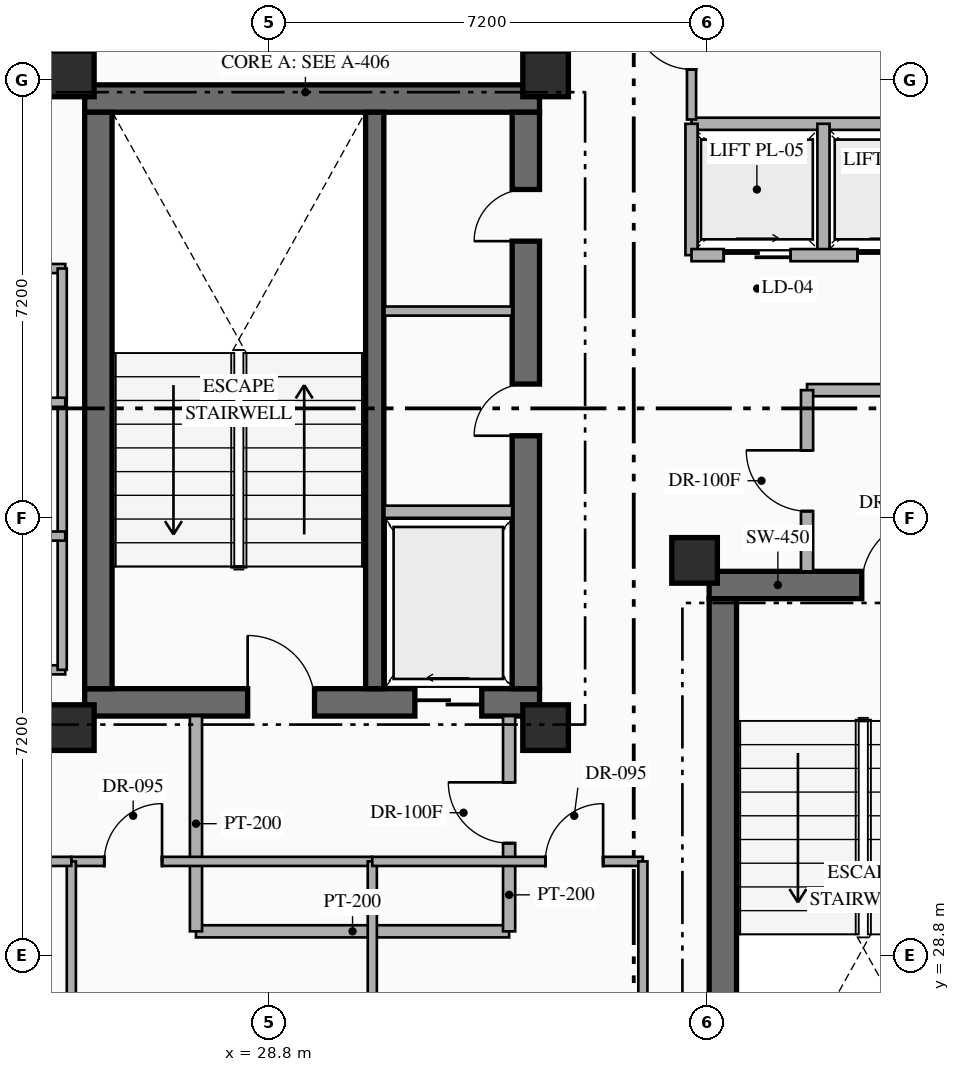
"""IFC4 building model, lengths in metres.
Left out: names, types, materials, properties, quantities, classifications, styles, units other than length and angle.
Written with IfcOpenShell. Run it as: python <this file> out.ifc"""

import sys

from ifc_helpers import new_model, si_unit, direction, frame, frame_2d, origin, origin_2d, place, context, subcontext, project, spatial, rectangle, hollow_rectangle, extrude, element, fill, save


model = new_model("IFC4")
c1 = context("Model", 3, precision=1e-05, world=origin(), true_north=direction((0.0, 1.0)))
c2 = subcontext(c1, "Body", "Model", "MODEL_VIEW")
j1 = project(units=[si_unit("LENGTHUNIT", "METRE"), si_unit("PLANEANGLEUNIT", "RADIAN")], contexts=[c1])
p1 = place(None, origin())
s1 = spatial("IfcSite", under=j1, at=p1, CompositionType="ELEMENT")
p2 = place(p1, origin())
s2 = spatial("IfcBuilding", under=s1, at=p2, CompositionType="ELEMENT")
p3 = place(p2, frame((0.0, 0.0, 213.15)))
s3 = spatial("IfcBuildingStorey", under=s2, at=p3, CompositionType="ELEMENT", Elevation=213.15)
p4 = place(p3, frame((25.77, 32.965, 0.0), z_axis=(0.0, 0.0, 1.0), x_axis=(1.0, 0.0, 0.0)))
e1 = element("IfcWall", 1, at=p4, inside=s3, PredefinedType="SHEAR", context=c2, shape_type="SweptSolid", body=[
    extrude(rectangle(XDim=7.48, YDim=0.45, at=frame_2d((3.74, 0.0))), origin(), (0.0, 0.0, 1.0), 3.6),
])
p5 = place(p4, frame((2.68, 0.0, 0.0)))
e2 = element("IfcOpeningElement", 2, at=p5, cuts=e1, PredefinedType="OPENING", context=c2, shape_type="SweptSolid", body=[
    extrude(rectangle(XDim=1.1, YDim=2.2, at=frame_2d((0.55, 1.1))), frame((0.0, 0.235, 0.0), z_axis=(0.0, -1.0, 0.0), x_axis=(1.0, 0.0, 0.0)), (0.0, 0.0, 1.0), 0.47),
])
p6 = place(p4, frame((5.43, 0.0, 0.0)))
e3 = element("IfcOpeningElement", 3, at=p6, cuts=e1, PredefinedType="OPENING", context=c2, shape_type="SweptSolid", body=[
    extrude(rectangle(XDim=1.1, YDim=2.15, at=frame_2d((0.55, 1.075))), frame((0.0, 0.235, 0.0), z_axis=(0.0, -1.0, 0.0), x_axis=(1.0, 0.0, 0.0)), (0.0, 0.0, 1.0), 0.47),
])
p7 = place(p3, frame((25.77, 42.895, 0.0), z_axis=(0.0, 0.0, 1.0), x_axis=(1.0, 0.0, 0.0)))
e4 = element("IfcWall", 4, at=p7, inside=s3, PredefinedType="SHEAR", context=c2, shape_type="SweptSolid", body=[
    extrude(rectangle(XDim=7.48, YDim=0.45, at=frame_2d((3.74, 0.0))), origin(), (0.0, 0.0, 1.0), 3.6),
])
p8 = place(p3, frame((25.995, 33.19, 0.0), z_axis=(0.0, 0.0, 1.0), x_axis=(0.0, 1.0, 0.0)))
e5 = element("IfcWall", 5, at=p8, inside=s3, PredefinedType="SHEAR", context=c2, shape_type="SweptSolid", body=[
    extrude(rectangle(XDim=9.48, YDim=0.45, at=frame_2d((4.74, 0.0))), origin(), (0.0, 0.0, 1.0), 3.6),
])
p9 = place(p3, frame((33.025, 33.19, 0.0), z_axis=(0.0, 0.0, 1.0), x_axis=(0.0, 1.0, 0.0)))
e6 = element("IfcWall", 6, at=p9, inside=s3, PredefinedType="SHEAR", context=c2, shape_type="SweptSolid", body=[
    extrude(rectangle(XDim=9.48, YDim=0.45, at=frame_2d((4.74, 0.0))), origin(), (0.0, 0.0, 1.0), 3.6),
])
p10 = place(p9, frame((4.16, 0.0, 0.0)))
e7 = element("IfcOpeningElement", 7, at=p10, cuts=e6, PredefinedType="OPENING", context=c2, shape_type="SweptSolid", body=[
    extrude(rectangle(XDim=0.85, YDim=2.08, at=frame_2d((0.425, 1.04))), frame((0.0, 0.235, 0.0), z_axis=(0.0, -1.0, 0.0), x_axis=(1.0, 0.0, 0.0)), (0.0, 0.0, 1.0), 0.47),
])
p11 = place(p9, frame((7.36, 0.0, 0.0)))
e8 = element("IfcOpeningElement", 8, at=p11, cuts=e6, PredefinedType="OPENING", context=c2, shape_type="SweptSolid", body=[
    extrude(rectangle(XDim=0.85, YDim=2.08, at=frame_2d((0.425, 1.04))), frame((0.0, 0.235, 0.0), z_axis=(0.0, -1.0, 0.0), x_axis=(1.0, 0.0, 0.0)), (0.0, 0.0, 1.0), 0.47),
])
p12 = place(p3, frame((30.54, 33.19, 0.0), z_axis=(0.0, 0.0, 1.0), x_axis=(0.0, 1.0, 0.0)))
e9 = element("IfcWall", 9, at=p12, inside=s3, PredefinedType="SHEAR", context=c2, shape_type="SweptSolid", body=[
    extrude(rectangle(XDim=9.48, YDim=0.3, at=frame_2d((4.74, 0.0))), origin(), (0.0, 0.0, 1.0), 3.6),
])
p13 = place(p3, frame((36.04, 34.895, 0.0), z_axis=(0.0, 0.0, 1.0), x_axis=(1.0, 0.0, 0.0)))
e10 = element("IfcWall", 10, at=p13, inside=s3, PredefinedType="SHEAR", context=c2, shape_type="SweptSolid", body=[
    extrude(rectangle(XDim=7.46, YDim=0.45, at=frame_2d((3.73, 0.0))), origin(), (0.0, 0.0, 1.0), 3.6),
])
p14 = place(p13, frame((2.51, 0.0, 0.0)))
e11 = element("IfcOpeningElement", 11, at=p14, cuts=e10, PredefinedType="OPENING", context=c2, shape_type="SweptSolid", body=[
    extrude(rectangle(XDim=1.1, YDim=2.2, at=frame_2d((0.55, 1.1))), frame((0.0, 0.235, 0.0), z_axis=(0.0, -1.0, 0.0), x_axis=(1.0, 0.0, 0.0)), (0.0, 0.0, 1.0), 0.47),
])
p15 = place(p13, frame((5.41, 0.0, 0.0)))
e12 = element("IfcOpeningElement", 12, at=p15, cuts=e10, PredefinedType="OPENING", context=c2, shape_type="SweptSolid", body=[
    extrude(rectangle(XDim=1.12, YDim=2.15, at=frame_2d((0.56, 1.075))), frame((0.0, 0.235, 0.0), z_axis=(0.0, -1.0, 0.0), x_axis=(1.0, 0.0, 0.0)), (0.0, 0.0, 1.0), 0.47),
])
p16 = place(p3, frame((36.265, 25.19, 0.0), z_axis=(0.0, 0.0, 1.0), x_axis=(0.0, 1.0, 0.0)))
e13 = element("IfcWall", 13, at=p16, inside=s3, PredefinedType="SHEAR", context=c2, shape_type="SweptSolid", body=[
    extrude(rectangle(XDim=9.48, YDim=0.45, at=frame_2d((4.74, 0.0))), origin(), (0.0, 0.0, 1.0), 3.6),
])
for number, where, z_axis, x_axis in (
    (14, (25.55, 32.55, 0.0), (0.0, 0.0, 1.0), (1.0, 0.0, 0.0)),
    (15, (33.35, 32.55, 0.0), (0.0, 0.0, 1.0), (1.0, 0.0, 0.0)),
    (16, (25.55, 43.3, 0.0), (0.0, 0.0, 1.0), (1.0, 0.0, 0.0)),
    (17, (33.35, 43.3, 0.0), (0.0, 0.0, 1.0), (1.0, 0.0, 0.0)),
    (18, (35.8, 35.3, 0.0), (0.0, 0.0, 1.0), (1.0, 0.0, 0.0)),
):
    element("IfcColumn", number, at=place(p3, frame(where, z_axis=z_axis, x_axis=x_axis)), inside=s3, PredefinedType="COLUMN", context=c2, shape_type="SweptSolid", body=[
        extrude(hollow_rectangle(XDim=0.75, YDim=0.75, WallThickness=0.028, at=origin_2d()), origin(), (0.0, 0.0, 1.0), 3.6),
    ])
p17 = place(p3, frame((30.7, 36.1, 0.0), z_axis=(0.0, 0.0, 1.0), x_axis=(1.0, 0.0, 0.0)))
e19 = element("IfcWall", 19, at=p17, inside=s3, PredefinedType="STANDARD", context=c2, shape_type="SweptSolid", body=[
    extrude(rectangle(XDim=2.1, YDim=0.2, at=frame_2d((1.05, 0.0))), origin(), (0.0, 0.0, 1.0), 3.35),
])
p18 = place(p3, frame((30.7, 39.4, 0.0), z_axis=(0.0, 0.0, 1.0), x_axis=(1.0, 0.0, 0.0)))
e20 = element("IfcWall", 20, at=p18, inside=s3, PredefinedType="PARTITIONING", context=c2, shape_type="SweptSolid", body=[
    extrude(rectangle(XDim=2.1, YDim=0.15, at=frame_2d((1.05, 0.0))), origin(), (0.0, 0.0, 1.0), 3.35),
])
p19 = place(p3, frame((27.6, 29.2, 0.0), z_axis=(0.0, 0.0, 1.0), x_axis=(1.0, 0.0, 0.0)))
e21 = element("IfcWall", 21, at=p19, inside=s3, PredefinedType="STANDARD", context=c2, shape_type="SweptSolid", body=[
    extrude(rectangle(XDim=5.15, YDim=0.2, at=frame_2d((2.575, 0.0))), origin(), (0.0, 0.0, 1.0), 3.35),
])
p20 = place(p3, frame((27.6, 29.2, 0.0), z_axis=(0.0, 0.0, 1.0), x_axis=(0.0, 1.0, 0.0)))
e22 = element("IfcWall", 22, at=p20, inside=s3, PredefinedType="STANDARD", context=c2, shape_type="SweptSolid", body=[
    extrude(rectangle(XDim=3.54, YDim=0.2, at=frame_2d((1.77, 0.0))), origin(), (0.0, 0.0, 1.0), 3.35),
])
p21 = place(p3, frame((32.75, 29.2, 0.0), z_axis=(0.0, 0.0, 1.0), x_axis=(0.0, 1.0, 0.0)))
e23 = element("IfcWall", 23, at=p21, inside=s3, PredefinedType="STANDARD", context=c2, shape_type="SweptSolid", body=[
    extrude(rectangle(XDim=3.54, YDim=0.2, at=frame_2d((1.77, 0.0))), origin(), (0.0, 0.0, 1.0), 3.35),
])
p22 = place(p21, frame((1.45, 0.0, 0.0)))
e24 = element("IfcOpeningElement", 24, at=p22, cuts=e23, PredefinedType="OPENING", context=c2, shape_type="SweptSolid", body=[
    extrude(rectangle(XDim=1.0, YDim=2.2, at=frame_2d((0.5, 1.1))), frame((0.0, 0.11, 0.0), z_axis=(0.0, -1.0, 0.0), x_axis=(1.0, 0.0, 0.0)), (0.0, 0.0, 1.0), 0.22),
])
p23 = place(p3, frame((37.65, 38.1, 0.0), z_axis=(0.0, 0.0, 1.0), x_axis=(1.0, 0.0, 0.0)))
e25 = element("IfcWall", 25, at=p23, inside=s3, PredefinedType="STANDARD", context=c2, shape_type="SweptSolid", body=[
    extrude(rectangle(XDim=5.3, YDim=0.2, at=frame_2d((2.65, 0.0))), origin(), (0.0, 0.0, 1.0), 3.35),
])
p24 = place(p3, frame((37.65, 35.12, 0.0), z_axis=(0.0, 0.0, 1.0), x_axis=(0.0, 1.0, 0.0)))
e26 = element("IfcWall", 26, at=p24, inside=s3, PredefinedType="STANDARD", context=c2, shape_type="SweptSolid", body=[
    extrude(rectangle(XDim=2.98, YDim=0.2, at=frame_2d((1.49, 0.0))), origin(), (0.0, 0.0, 1.0), 3.35),
])
p25 = place(p24, frame((0.99, 0.0, 0.0)))
e27 = element("IfcOpeningElement", 27, at=p25, cuts=e26, PredefinedType="OPENING", context=c2, shape_type="SweptSolid", body=[
    extrude(rectangle(XDim=1.0, YDim=2.2, at=frame_2d((0.5, 1.1))), frame((0.0, 0.11, 0.0), z_axis=(0.0, -1.0, 0.0), x_axis=(1.0, 0.0, 0.0)), (0.0, 0.0, 1.0), 0.22),
])
p26 = place(p3, frame((35.75, 42.48, 0.0), z_axis=(0.0, 0.0, 1.0), x_axis=(1.0, 0.0, 0.0)))
e28 = element("IfcWall", 28, at=p26, inside=s3, PredefinedType="STANDARD", context=c2, shape_type="SweptSolid", body=[
    extrude(rectangle(XDim=9.11, YDim=0.2, at=frame_2d((4.555, 0.0))), origin(), (0.0, 0.0, 1.0), 3.35),
])
for number, where, z_axis, x_axis in (
    (29, (35.75, 40.32, 0.0), (0.0, 0.0, 1.0), (0.0, 1.0, 0.0)),
    (30, (37.92, 40.32, 0.0), (0.0, 0.0, 1.0), (0.0, 1.0, 0.0)),
):
    element("IfcWall", number, at=place(p3, frame(where, z_axis=z_axis, x_axis=x_axis)), inside=s3, PredefinedType="STANDARD", context=c2, shape_type="SweptSolid", body=[
        extrude(rectangle(XDim=2.16, YDim=0.2, at=frame_2d((1.08, 0.0))), origin(), (0.0, 0.0, 1.0), 3.35),
    ])
p27 = place(p3, frame((35.75, 40.32, 0.0), z_axis=(0.0, 0.0, 1.0), x_axis=(1.0, 0.0, 0.0)))
e31 = element("IfcWall", 31, at=p27, inside=s3, PredefinedType="STANDARD", context=c2, shape_type="SweptSolid", body=[
    extrude(rectangle(XDim=9.11, YDim=0.2, at=frame_2d((4.555, 0.0))), origin(), (0.0, 0.0, 1.0), 3.35),
])
p28 = place(p27, frame((0.53, 0.0, 0.0)))
e32 = element("IfcOpeningElement", 32, at=p28, cuts=e31, PredefinedType="OPENING", context=c2, shape_type="SweptSolid", body=[
    extrude(rectangle(XDim=1.1, YDim=2.18, at=frame_2d((0.55, 1.09))), frame((0.0, 0.11, 0.0), z_axis=(0.0, -1.0, 0.0), x_axis=(1.0, 0.0, 0.0)), (0.0, 0.0, 1.0), 0.22),
])
p29 = place(p27, frame((2.73, 0.0, 0.0)))
e33 = element("IfcOpeningElement", 33, at=p29, cuts=e31, PredefinedType="OPENING", context=c2, shape_type="SweptSolid", body=[
    extrude(rectangle(XDim=1.1, YDim=2.18, at=frame_2d((0.55, 1.09))), frame((0.0, 0.11, 0.0), z_axis=(0.0, -1.0, 0.0), x_axis=(1.0, 0.0, 0.0)), (0.0, 0.0, 1.0), 0.22),
])
p30 = place(p27, frame((4.93, 0.0, 0.0)))
e34 = element("IfcOpeningElement", 34, at=p30, cuts=e31, PredefinedType="OPENING", context=c2, shape_type="SweptSolid", body=[
    extrude(rectangle(XDim=1.1, YDim=2.18, at=frame_2d((0.55, 1.09))), frame((0.0, 0.11, 0.0), z_axis=(0.0, -1.0, 0.0), x_axis=(1.0, 0.0, 0.0)), (0.0, 0.0, 1.0), 0.22),
])
p31 = place(p27, frame((7.13, 0.0, 0.0)))
e35 = element("IfcOpeningElement", 35, at=p31, cuts=e31, PredefinedType="OPENING", context=c2, shape_type="SweptSolid", body=[
    extrude(rectangle(XDim=1.1, YDim=2.18, at=frame_2d((0.55, 1.09))), frame((0.0, 0.11, 0.0), z_axis=(0.0, -1.0, 0.0), x_axis=(1.0, 0.0, 0.0)), (0.0, 0.0, 1.0), 0.22),
])
for number, where, z_axis, x_axis in (
    (36, (22.15, 33.5, 0.0), (0.0, 0.0, 1.0), (1.0, 0.0, 0.0)),
    (37, (22.15, 40.1, 0.0), (0.0, 0.0, 1.0), (1.0, 0.0, 0.0)),
):
    element("IfcWall", number, at=place(p3, frame(where, z_axis=z_axis, x_axis=x_axis)), inside=s3, PredefinedType="PARTITIONING", context=c2, shape_type="SweptSolid", body=[
        extrude(rectangle(XDim=3.3, YDim=0.15, at=frame_2d((1.65, 0.0))), origin(), (0.0, 0.0, 1.0), 3.35),
    ])
p32 = place(p3, frame((25.4, 33.5, 0.0), z_axis=(0.0, 0.0, 1.0), x_axis=(0.0, 1.0, 0.0)))
e38 = element("IfcWall", 38, at=p32, inside=s3, PredefinedType="PARTITIONING", context=c2, shape_type="SweptSolid", body=[
    extrude(rectangle(XDim=6.6, YDim=0.15, at=frame_2d((3.3, 0.0))), origin(), (0.0, 0.0, 1.0), 3.35),
])
for number, where, z_axis, x_axis in (
    (39, (22.15, 35.7, 0.0), (0.0, 0.0, 1.0), (1.0, 0.0, 0.0)),
    (40, (22.15, 37.9, 0.0), (0.0, 0.0, 1.0), (1.0, 0.0, 0.0)),
):
    element("IfcWall", number, at=place(p3, frame(where, z_axis=z_axis, x_axis=x_axis)), inside=s3, PredefinedType="PARTITIONING", context=c2, shape_type="SweptSolid", body=[
        extrude(rectangle(XDim=3.3, YDim=0.15, at=frame_2d((1.65, 0.0))), origin(), (0.0, 0.0, 1.0), 3.35),
    ])
p33 = place(p3, frame((25.55, 30.35, 0.0), z_axis=(0.0, 0.0, 1.0), x_axis=(1.0, 0.0, 0.0)))
e41 = element("IfcWall", 41, at=p33, inside=s3, PredefinedType="PARTITIONING", context=c2, shape_type="SweptSolid", body=[
    extrude(rectangle(XDim=4.95, YDim=0.15, at=frame_2d((2.475, 0.0))), origin(), (0.0, 0.0, 1.0), 3.35),
])
p34 = place(p33, frame((0.542, 0.0, 0.0)))
e42 = element("IfcOpeningElement", 42, at=p34, cuts=e41, PredefinedType="OPENING", context=c2, shape_type="SweptSolid", body=[
    extrude(rectangle(XDim=0.95, YDim=2.15, at=frame_2d((0.475, 1.075))), frame((0.0, 0.085, 0.0), z_axis=(0.0, -1.0, 0.0), x_axis=(1.0, 0.0, 0.0)), (0.0, 0.0, 1.0), 0.17),
])
p35 = place(p3, frame((25.55, 23.2, 0.0), z_axis=(0.0, 0.0, 1.0), x_axis=(0.0, 1.0, 0.0)))
e43 = element("IfcWall", 43, at=p35, inside=s3, PredefinedType="PARTITIONING", context=c2, shape_type="SweptSolid", body=[
    extrude(rectangle(XDim=7.15, YDim=0.15, at=frame_2d((3.575, 0.0))), origin(), (0.0, 0.0, 1.0), 2.757),
])
p36 = place(p3, frame((30.5, 23.2, 0.0), z_axis=(0.0, 0.0, 1.0), x_axis=(0.0, 1.0, 0.0)))
e44 = element("IfcWall", 44, at=p36, inside=s3, PredefinedType="PARTITIONING", context=c2, shape_type="SweptSolid", body=[
    extrude(rectangle(XDim=7.15, YDim=0.15, at=frame_2d((3.575, 0.0))), origin(), (0.0, 0.0, 1.0), 3.35),
])
p37 = place(p3, frame((30.5, 30.35, 0.0), z_axis=(0.0, 0.0, 1.0), x_axis=(1.0, 0.0, 0.0)))
e45 = element("IfcWall", 45, at=p37, inside=s3, PredefinedType="PARTITIONING", context=c2, shape_type="SweptSolid", body=[
    extrude(rectangle(XDim=4.45, YDim=0.15, at=frame_2d((2.225, 0.0))), origin(), (0.0, 0.0, 1.0), 3.35),
])
p38 = place(p37, frame((2.846, 0.0, 0.0)))
e46 = element("IfcOpeningElement", 46, at=p38, cuts=e45, PredefinedType="OPENING", context=c2, shape_type="SweptSolid", body=[
    extrude(rectangle(XDim=0.95, YDim=2.15, at=frame_2d((0.475, 1.075))), frame((0.0, 0.085, 0.0), z_axis=(0.0, -1.0, 0.0), x_axis=(1.0, 0.0, 0.0)), (0.0, 0.0, 1.0), 0.17),
])
p39 = place(p3, frame((34.95, 23.2, 0.0), z_axis=(0.0, 0.0, 1.0), x_axis=(0.0, 1.0, 0.0)))
e47 = element("IfcWall", 47, at=p39, inside=s3, PredefinedType="PARTITIONING", context=c2, shape_type="SweptSolid", body=[
    extrude(rectangle(XDim=7.15, YDim=0.15, at=frame_2d((3.575, 0.0))), origin(), (0.0, 0.0, 1.0), 3.35),
])
p40 = place(p3, frame((22.25, 30.35, 0.0), z_axis=(0.0, 0.0, 1.0), x_axis=(1.0, 0.0, 0.0)))
e48 = element("IfcWall", 48, at=p40, inside=s3, PredefinedType="PARTITIONING", context=c2, shape_type="SweptSolid", body=[
    extrude(rectangle(XDim=3.3, YDim=0.15, at=frame_2d((1.65, 0.0))), origin(), (0.0, 0.0, 1.0), 3.35),
])
p41 = place(p40, frame((1.175, 0.0, 0.0)))
e49 = element("IfcOpeningElement", 49, at=p41, cuts=e48, PredefinedType="OPENING", context=c2, shape_type="SweptSolid", body=[
    extrude(rectangle(XDim=0.95, YDim=2.15, at=frame_2d((0.475, 1.075))), frame((0.0, 0.085, 0.0), z_axis=(0.0, -1.0, 0.0), x_axis=(1.0, 0.0, 0.0)), (0.0, 0.0, 1.0), 0.17),
])
p42 = place(p3, frame((35.75, 42.55, 0.0), z_axis=(0.0, 0.0, 1.0), x_axis=(0.0, 1.0, 0.0)))
e50 = element("IfcWall", 50, at=p42, inside=s3, PredefinedType="PARTITIONING", context=c2, shape_type="SweptSolid", body=[
    extrude(rectangle(XDim=2.6, YDim=0.15, at=frame_2d((1.3, 0.0))), origin(), (0.0, 0.0, 1.0), 3.35),
])
p43 = place(p42, frame((0.825, 0.0, 0.0)))
e51 = element("IfcOpeningElement", 51, at=p43, cuts=e50, PredefinedType="OPENING", context=c2, shape_type="SweptSolid", body=[
    extrude(rectangle(XDim=0.95, YDim=2.15, at=frame_2d((0.475, 1.075))), frame((0.0, 0.085, 0.0), z_axis=(0.0, -1.0, 0.0), x_axis=(1.0, 0.0, 0.0)), (0.0, 0.0, 1.0), 0.17),
])
p44 = place(p5, origin())
e52 = element("IfcDoor", 52, at=p44, inside=s3, OperationType="SINGLE_SWING_LEFT", PredefinedType="DOOR", context=c2, shape_type="SweptSolid", body=[
    extrude(rectangle(XDim=1.1, YDim=2.2, at=frame_2d((0.55, 1.1))), frame((0.0, 0.025, 0.0), z_axis=(0.0, -1.0, 0.0), x_axis=(1.0, 0.0, 0.0)), (0.0, 0.0, 1.0), 0.05),
])
fill(e2, e52)
p45 = place(p6, origin())
e53 = element("IfcDoor", 53, at=p45, inside=s3, OperationType="SLIDING_TO_LEFT", PredefinedType="USERDEFINED", context=c2, shape_type="SweptSolid", body=[
    extrude(rectangle(XDim=1.1, YDim=2.15, at=frame_2d((0.55, 1.075))), frame((0.0, 0.025, 0.0), z_axis=(0.0, -1.0, 0.0), x_axis=(1.0, 0.0, 0.0)), (0.0, 0.0, 1.0), 0.05),
])
fill(e3, e53)
p46 = place(p14, origin())
e54 = element("IfcDoor", 54, at=p46, inside=s3, OperationType="SINGLE_SWING_RIGHT", PredefinedType="DOOR", context=c2, shape_type="SweptSolid", body=[
    extrude(rectangle(XDim=1.1, YDim=2.2, at=frame_2d((0.55, 1.1))), frame((0.0, 0.025, 0.0), z_axis=(0.0, -1.0, 0.0), x_axis=(1.0, 0.0, 0.0)), (0.0, 0.0, 1.0), 0.05),
])
fill(e11, e54)
p47 = place(p10, origin())
e55 = element("IfcDoor", 55, at=p47, inside=s3, OperationType="SINGLE_SWING_LEFT", PredefinedType="DOOR", context=c2, shape_type="SweptSolid", body=[
    extrude(rectangle(XDim=0.85, YDim=2.08, at=frame_2d((0.425, 1.04))), frame((0.0, 0.025, 0.0), z_axis=(0.0, -1.0, 0.0), x_axis=(1.0, 0.0, 0.0)), (0.0, 0.0, 1.0), 0.05),
])
fill(e7, e55)
p48 = place(p11, origin())
e56 = element("IfcDoor", 56, at=p48, inside=s3, OperationType="SINGLE_SWING_LEFT", PredefinedType="DOOR", context=c2, shape_type="SweptSolid", body=[
    extrude(rectangle(XDim=0.85, YDim=2.08, at=frame_2d((0.425, 1.04))), frame((0.0, 0.025, 0.0), z_axis=(0.0, -1.0, 0.0), x_axis=(1.0, 0.0, 0.0)), (0.0, 0.0, 1.0), 0.05),
])
fill(e8, e56)
p49 = place(p22, origin())
e57 = element("IfcDoor", 57, at=p49, inside=s3, OperationType="SINGLE_SWING_RIGHT", PredefinedType="DOOR", context=c2, shape_type="SweptSolid", body=[
    extrude(rectangle(XDim=1.0, YDim=2.2, at=frame_2d((0.5, 1.1))), frame((0.0, 0.025, 0.0), z_axis=(0.0, -1.0, 0.0), x_axis=(1.0, 0.0, 0.0)), (0.0, 0.0, 1.0), 0.05),
])
fill(e24, e57)
p50 = place(p25, origin())
e58 = element("IfcDoor", 58, at=p50, inside=s3, OperationType="SINGLE_SWING_RIGHT", PredefinedType="DOOR", context=c2, shape_type="SweptSolid", body=[
    extrude(rectangle(XDim=1.0, YDim=2.2, at=frame_2d((0.5, 1.1))), frame((0.0, 0.025, 0.0), z_axis=(0.0, -1.0, 0.0), x_axis=(1.0, 0.0, 0.0)), (0.0, 0.0, 1.0), 0.05),
])
fill(e27, e58)
p51 = place(p28, origin())
e59 = element("IfcDoor", 59, at=p51, inside=s3, OperationType="SLIDING_TO_RIGHT", PredefinedType="USERDEFINED", context=c2, shape_type="SweptSolid", body=[
    extrude(rectangle(XDim=1.1, YDim=2.18, at=frame_2d((0.55, 1.09))), frame((0.0, 0.025, 0.0), z_axis=(0.0, -1.0, 0.0), x_axis=(1.0, 0.0, 0.0)), (0.0, 0.0, 1.0), 0.05),
])
fill(e32, e59)
p52 = place(p29, origin())
e60 = element("IfcDoor", 60, at=p52, inside=s3, OperationType="SLIDING_TO_RIGHT", PredefinedType="USERDEFINED", context=c2, shape_type="SweptSolid", body=[
    extrude(rectangle(XDim=1.1, YDim=2.18, at=frame_2d((0.55, 1.09))), frame((0.0, 0.025, 0.0), z_axis=(0.0, -1.0, 0.0), x_axis=(1.0, 0.0, 0.0)), (0.0, 0.0, 1.0), 0.05),
])
fill(e33, e60)
p53 = place(p34, origin())
e61 = element("IfcDoor", 61, at=p53, inside=s3, OperationType="SINGLE_SWING_RIGHT", PredefinedType="DOOR", context=c2, shape_type="SweptSolid", body=[
    extrude(rectangle(XDim=0.95, YDim=2.15, at=frame_2d((0.475, 1.075))), frame((0.0, 0.025, 0.0), z_axis=(0.0, -1.0, 0.0), x_axis=(1.0, 0.0, 0.0)), (0.0, 0.0, 1.0), 0.05),
])
fill(e42, e61)
p54 = place(p38, origin())
e62 = element("IfcDoor", 62, at=p54, inside=s3, OperationType="SINGLE_SWING_RIGHT", PredefinedType="DOOR", context=c2, shape_type="SweptSolid", body=[
    extrude(rectangle(XDim=0.95, YDim=2.15, at=frame_2d((0.475, 1.075))), frame((0.0, 0.025, 0.0), z_axis=(0.0, -1.0, 0.0), x_axis=(1.0, 0.0, 0.0)), (0.0, 0.0, 1.0), 0.05),
])
fill(e46, e62)
p55 = place(p43, origin())
e63 = element("IfcDoor", 63, at=p55, inside=s3, OperationType="SINGLE_SWING_RIGHT", PredefinedType="DOOR", context=c2, shape_type="SweptSolid", body=[
    extrude(rectangle(XDim=0.95, YDim=2.15, at=frame_2d((0.475, 1.075))), frame((0.0, 0.025, 0.0), z_axis=(0.0, -1.0, 0.0), x_axis=(1.0, 0.0, 0.0)), (0.0, 0.0, 1.0), 0.05),
])
fill(e51, e63)
save(model, sys.argv[1])
